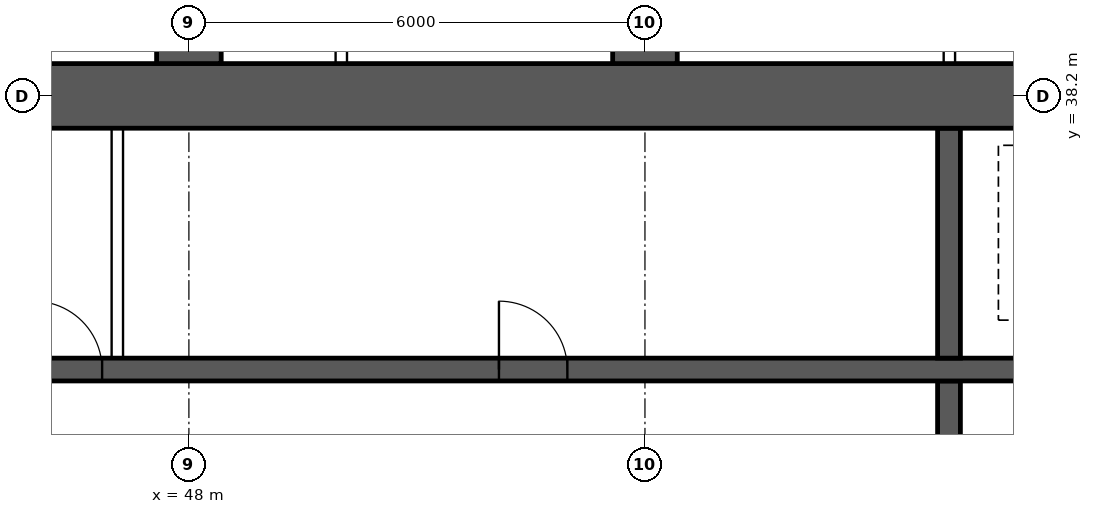
"""IFC4 building model, lengths in metres.
Left out: names, types, materials, properties, quantities, classifications, styles, units other than length and angle.
Written with IfcOpenShell. Run it as: python <this file> out.ifc"""

import sys

from ifc_helpers import new_model, si_unit, direction, frame, frame_2d, origin, place, context, subcontext, project, spatial, rectangle, extrude, element, fill, save


model = new_model("IFC4")
c1 = context("Model", 3, precision=1e-05, world=origin(), true_north=direction((0.0, 1.0)))
c2 = subcontext(c1, "Body", "Model", "MODEL_VIEW")
j1 = project(units=[si_unit("LENGTHUNIT", "METRE"), si_unit("PLANEANGLEUNIT", "RADIAN")], contexts=[c1])
p1 = place(None, origin())
s1 = spatial("IfcSite", under=j1, at=p1, CompositionType="ELEMENT")
p2 = place(p1, origin())
s2 = spatial("IfcBuilding", under=s1, at=p2, CompositionType="ELEMENT")
p3 = place(p2, frame((0.0, 0.0, 178.6)))
s3 = spatial("IfcBuildingStorey", under=s2, at=p3, CompositionType="ELEMENT", Elevation=178.6)
p4 = place(p3, frame((18.0, 38.2, 0.0), z_axis=(0.0, 0.0, 1.0), x_axis=(1.0, 0.0, 0.0)))
e1 = element("IfcWall", 1, at=p4, inside=s3, PredefinedType="SHEAR", context=c2, shape_type="SweptSolid", body=[
    extrude(rectangle(XDim=48.0, YDim=0.85, at=frame_2d((24.0, 0.0))), origin(), (0.0, 0.0, 1.0), 3.75),
])
p5 = place(p3, frame((18.425, 34.6, 0.0), z_axis=(0.0, 0.0, 1.0), x_axis=(1.0, 0.0, 0.0)))
e2 = element("IfcWall", 2, at=p5, inside=s3, PredefinedType="SHEAR", context=c2, shape_type="SweptSolid", body=[
    extrude(rectangle(XDim=47.15, YDim=0.3, at=frame_2d((23.575, 0.0))), origin(), (0.0, 0.0, 1.0), 3.75),
])
p6 = place(p5, frame((0.9, 0.0, 0.0)))
e3 = element("IfcOpeningElement", 3, at=p6, cuts=e2, PredefinedType="OPENING", context=c2, shape_type="SweptSolid", body=[
    extrude(rectangle(XDim=1.1, YDim=2.1, at=frame_2d((0.55, 1.05))), frame((0.0, 0.16, 0.0), z_axis=(0.0, -1.0, 0.0), x_axis=(1.0, 0.0, 0.0)), (0.0, 0.0, 1.0), 0.32),
])
p7 = place(p5, frame((45.15, 0.0, 0.0)))
e4 = element("IfcOpeningElement", 4, at=p7, cuts=e2, PredefinedType="OPENING", context=c2, shape_type="SweptSolid", body=[
    extrude(rectangle(XDim=1.1, YDim=2.1, at=frame_2d((0.55, 1.05))), frame((0.0, 0.16, 0.0), z_axis=(0.0, -1.0, 0.0), x_axis=(1.0, 0.0, 0.0)), (0.0, 0.0, 1.0), 0.32),
])
p8 = place(p5, frame((4.175, 0.0, 0.0)))
e5 = element("IfcOpeningElement", 5, at=p8, cuts=e2, PredefinedType="OPENING", context=c2, shape_type="SweptSolid", body=[
    extrude(rectangle(XDim=0.9, YDim=2.1, at=frame_2d((0.45, 1.05))), frame((0.0, 0.16, 0.0), z_axis=(0.0, -1.0, 0.0), x_axis=(1.0, 0.0, 0.0)), (0.0, 0.0, 1.0), 0.32),
])
p9 = place(p5, frame((42.075, 0.0, 0.0)))
e6 = element("IfcOpeningElement", 6, at=p9, cuts=e2, PredefinedType="OPENING", context=c2, shape_type="SweptSolid", body=[
    extrude(rectangle(XDim=0.9, YDim=2.1, at=frame_2d((0.45, 1.05))), frame((0.0, 0.16, 0.0), z_axis=(0.0, -1.0, 0.0), x_axis=(1.0, 0.0, 0.0)), (0.0, 0.0, 1.0), 0.32),
])
p10 = place(p5, frame((8.95, 0.0, 0.0)))
e7 = element("IfcOpeningElement", 7, at=p10, cuts=e2, PredefinedType="OPENING", context=c2, shape_type="SweptSolid", body=[
    extrude(rectangle(XDim=0.9, YDim=2.1, at=frame_2d((0.45, 1.05))), frame((0.0, 0.16, 0.0), z_axis=(0.0, -1.0, 0.0), x_axis=(1.0, 0.0, 0.0)), (0.0, 0.0, 1.0), 0.32),
])
p11 = place(p5, frame((12.924, 0.0, 0.0)))
e8 = element("IfcOpeningElement", 8, at=p11, cuts=e2, PredefinedType="OPENING", context=c2, shape_type="SweptSolid", body=[
    extrude(rectangle(XDim=0.9, YDim=2.1, at=frame_2d((0.45, 1.05))), frame((0.0, 0.16, 0.0), z_axis=(0.0, -1.0, 0.0), x_axis=(1.0, 0.0, 0.0)), (0.0, 0.0, 1.0), 0.32),
])
p12 = place(p5, frame((16.571, 0.0, 0.0)))
e9 = element("IfcOpeningElement", 9, at=p12, cuts=e2, PredefinedType="OPENING", context=c2, shape_type="SweptSolid", body=[
    extrude(rectangle(XDim=0.9, YDim=2.1, at=frame_2d((0.45, 1.05))), frame((0.0, 0.16, 0.0), z_axis=(0.0, -1.0, 0.0), x_axis=(1.0, 0.0, 0.0)), (0.0, 0.0, 1.0), 0.32),
])
p13 = place(p5, frame((20.33, 0.0, 0.0)))
e10 = element("IfcOpeningElement", 10, at=p13, cuts=e2, PredefinedType="OPENING", context=c2, shape_type="SweptSolid", body=[
    extrude(rectangle(XDim=0.9, YDim=2.1, at=frame_2d((0.45, 1.05))), frame((0.0, 0.16, 0.0), z_axis=(0.0, -1.0, 0.0), x_axis=(1.0, 0.0, 0.0)), (0.0, 0.0, 1.0), 0.32),
])
p14 = place(p5, frame((24.736, 0.0, 0.0)))
e11 = element("IfcOpeningElement", 11, at=p14, cuts=e2, PredefinedType="OPENING", context=c2, shape_type="SweptSolid", body=[
    extrude(rectangle(XDim=0.9, YDim=2.1, at=frame_2d((0.45, 1.05))), frame((0.0, 0.16, 0.0), z_axis=(0.0, -1.0, 0.0), x_axis=(1.0, 0.0, 0.0)), (0.0, 0.0, 1.0), 0.32),
])
p15 = place(p5, frame((27.533, 0.0, 0.0)))
e12 = element("IfcOpeningElement", 12, at=p15, cuts=e2, PredefinedType="OPENING", context=c2, shape_type="SweptSolid", body=[
    extrude(rectangle(XDim=0.9, YDim=2.1, at=frame_2d((0.45, 1.05))), frame((0.0, 0.16, 0.0), z_axis=(0.0, -1.0, 0.0), x_axis=(1.0, 0.0, 0.0)), (0.0, 0.0, 1.0), 0.32),
])
p16 = place(p5, frame((33.654, 0.0, 0.0)))
e13 = element("IfcOpeningElement", 13, at=p16, cuts=e2, PredefinedType="OPENING", context=c2, shape_type="SweptSolid", body=[
    extrude(rectangle(XDim=0.9, YDim=2.1, at=frame_2d((0.45, 1.05))), frame((0.0, 0.16, 0.0), z_axis=(0.0, -1.0, 0.0), x_axis=(1.0, 0.0, 0.0)), (0.0, 0.0, 1.0), 0.32),
])
p17 = place(p3, frame((58.0, 30.55, 0.0), z_axis=(0.0, 0.0, 1.0), x_axis=(0.0, 1.0, 0.0)))
e14 = element("IfcWall", 14, at=p17, inside=s3, PredefinedType="SHEAR", context=c2, shape_type="SweptSolid", body=[
    extrude(rectangle(XDim=3.9, YDim=0.3, at=frame_2d((1.95, 0.0))), origin(), (0.0, 0.0, 1.0), 3.75),
])
p18 = place(p17, frame((1.4, 0.0, 0.0)))
e15 = element("IfcOpeningElement", 15, at=p18, cuts=e14, PredefinedType="OPENING", context=c2, shape_type="SweptSolid", body=[
    extrude(rectangle(XDim=1.2, YDim=2.1, at=frame_2d((0.6, 1.05))), frame((0.0, 0.16, 0.0), z_axis=(0.0, -1.0, 0.0), x_axis=(1.0, 0.0, 0.0)), (0.0, 0.0, 1.0), 0.32),
])
p19 = place(p3, frame((58.0, 34.75, 0.0), z_axis=(0.0, 0.0, 1.0), x_axis=(0.0, 1.0, 0.0)))
e16 = element("IfcWall", 16, at=p19, inside=s3, PredefinedType="SHEAR", context=c2, shape_type="SweptSolid", body=[
    extrude(rectangle(XDim=3.025, YDim=0.3, at=frame_2d((1.512, 0.0))), origin(), (0.0, 0.0, 1.0), 3.75),
])
for number, where, z_axis, x_axis in (
    (17, (48.0, 38.625, 0.0), (0.0, 0.0, 1.0), (0.0, 1.0, 0.0)),
    (18, (54.0, 38.625, 0.0), (0.0, 0.0, 1.0), (0.0, 1.0, 0.0)),
):
    element("IfcWall", number, at=place(p3, frame(where, z_axis=z_axis, x_axis=x_axis)), inside=s3, PredefinedType="SHEAR", context=c2, shape_type="SweptSolid", body=[
        extrude(rectangle(XDim=8.175, YDim=0.85, at=frame_2d((4.087, 0.0))), origin(), (0.0, 0.0, 1.0), 3.75),
    ])
p20 = place(p3, frame((47.058, 34.75, 0.0), z_axis=(0.0, 0.0, 1.0), x_axis=(0.0, 1.0, 0.0)))
e19 = element("IfcWall", 19, at=p20, inside=s3, PredefinedType="SOLIDWALL", context=c2, shape_type="SweptSolid", body=[
    extrude(rectangle(XDim=3.025, YDim=0.15, at=frame_2d((1.512, 0.0))), origin(), (0.0, 0.0, 1.0), 3.5),
])
for number, where, z_axis, x_axis in (
    (20, (50.005, 38.625, 0.0), (0.0, 0.0, 1.0), (0.0, 1.0, 0.0)),
    (21, (58.005, 38.625, 0.0), (0.0, 0.0, 1.0), (0.0, 1.0, 0.0)),
):
    element("IfcWall", number, at=place(p3, frame(where, z_axis=z_axis, x_axis=x_axis)), inside=s3, PredefinedType="PARTITIONING", context=c2, shape_type="SweptSolid", body=[
        extrude(rectangle(XDim=8.075, YDim=0.15, at=frame_2d((4.038, 0.0))), origin(), (0.0, 0.0, 1.0), 3.5),
    ])
p21 = place(p15, origin())
e22 = element("IfcDoor", 22, at=p21, inside=s3, OperationType="SINGLE_SWING_LEFT", PredefinedType="DOOR", context=c2, shape_type="SweptSolid", body=[
    extrude(rectangle(XDim=0.9, YDim=2.1, at=frame_2d((0.45, 1.05))), frame((0.0, 0.025, 0.0), z_axis=(0.0, -1.0, 0.0), x_axis=(1.0, 0.0, 0.0)), (0.0, 0.0, 1.0), 0.05),
])
fill(e12, e22)
p22 = place(p16, origin())
e23 = element("IfcDoor", 23, at=p22, inside=s3, OperationType="SINGLE_SWING_LEFT", PredefinedType="DOOR", context=c2, shape_type="SweptSolid", body=[
    extrude(rectangle(XDim=0.9, YDim=2.1, at=frame_2d((0.45, 1.05))), frame((0.0, 0.025, 0.0), z_axis=(0.0, -1.0, 0.0), x_axis=(1.0, 0.0, 0.0)), (0.0, 0.0, 1.0), 0.05),
])
fill(e13, e23)
save(model, sys.argv[1])
